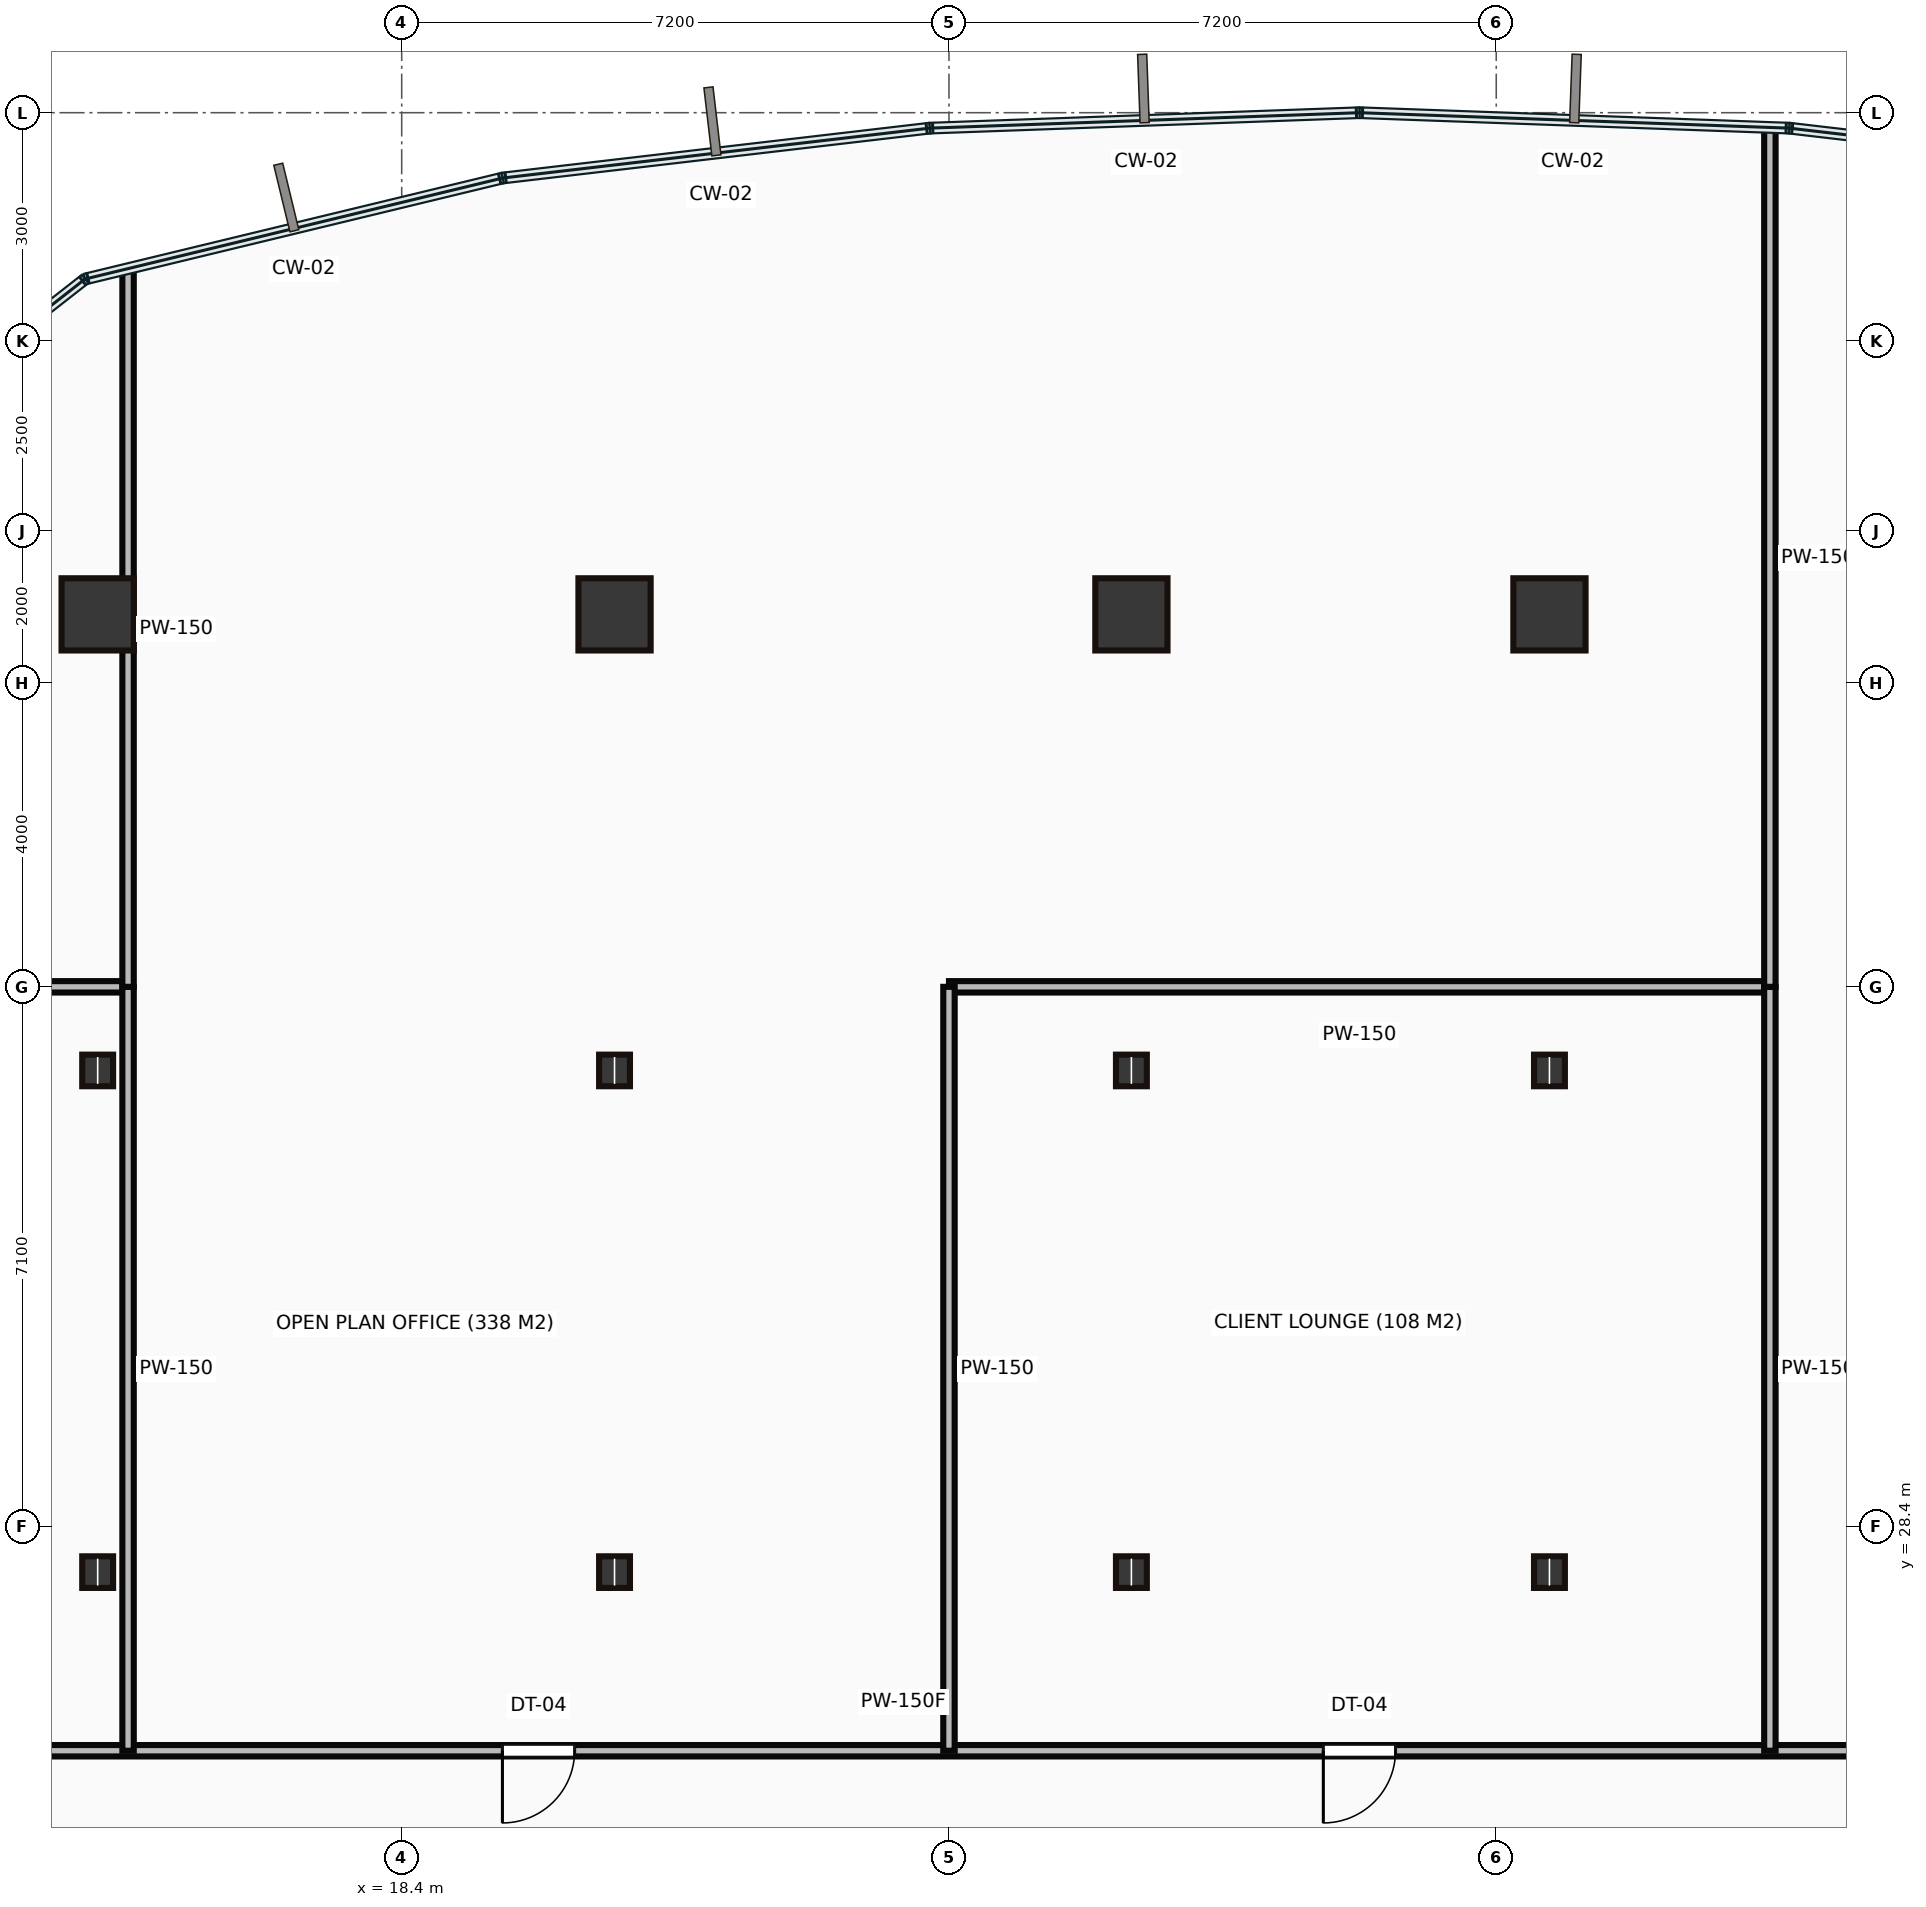
"""IFC4 building model, lengths in metres.
Left out: names, types, materials, properties, quantities, classifications, styles, units other than length and angle.
Written with IfcOpenShell. Run it as: python <this file> out.ifc"""

import sys

from ifc_helpers import new_model, si_unit, direction, frame, frame_2d, origin, origin_2d, place, context, subcontext, project, spatial, rectangle, hollow_rectangle, i_section, extrude, source, transform, mapped, element, fill, save


model = new_model("IFC4")
c1 = context("Model", 3, precision=1e-05, world=origin(), true_north=direction((0.0, 1.0)))
c2 = subcontext(c1, "Body", "Model", "MODEL_VIEW")
j1 = project(units=[si_unit("LENGTHUNIT", "METRE"), si_unit("PLANEANGLEUNIT", "RADIAN")], contexts=[c1])
p1 = place(None, origin())
s1 = spatial("IfcSite", under=j1, at=p1, CompositionType="ELEMENT")
p2 = place(p1, origin())
s2 = spatial("IfcBuilding", under=s1, at=p2, CompositionType="ELEMENT")
p3 = place(p2, frame((0.0, 0.0, 32.5)))
s3 = spatial("IfcBuildingStorey", under=s2, at=p3, CompositionType="ELEMENT", Elevation=32.5)
m1 = source(origin(), c2, "Body", "SweptSolid", [
    extrude(i_section(OverallWidth=0.406, OverallDepth=0.416, WebThickness=0.03, FlangeThickness=0.048, at=origin_2d()), origin(), (0.0, 0.0, 1.0), 3.65),
])
for number, where, z_axis, x_axis in (
    (1, (14.4, 27.8, 0.0), (0.0, 0.0, 1.0), (1.0, 0.0, 0.0)),
    (2, (14.4, 34.4, 0.0), (0.0, 0.0, 1.0), (1.0, 0.0, 0.0)),
):
    element("IfcColumn", number, at=place(p3, frame(where, z_axis=z_axis, x_axis=x_axis)), inside=s3, PredefinedType="COLUMN", context=c2, shape_type="MappedRepresentation", body=[
        mapped(m1, transform((0.0, 0.0, 0.0))),
    ])
m2 = source(origin(), c2, "Body", "SweptSolid", [
    extrude(hollow_rectangle(XDim=0.95, YDim=0.95, WallThickness=0.045, at=origin_2d()), origin(), (0.0, 0.0, 1.0), 3.65),
])
p4 = place(p3, frame((14.4, 40.4, 0.0), z_axis=(0.0, 0.0, 1.0), x_axis=(1.0, 0.0, 0.0)))
e3 = element("IfcColumn", 3, at=p4, inside=s3, PredefinedType="COLUMN", context=c2, shape_type="MappedRepresentation", body=[
    mapped(m2, transform((0.0, 0.0, 0.0))),
])
for number, where, z_axis, x_axis in (
    (4, (21.2, 27.8, 0.0), (0.0, 0.0, 1.0), (1.0, 0.0, 0.0)),
    (5, (21.2, 34.4, 0.0), (0.0, 0.0, 1.0), (1.0, 0.0, 0.0)),
):
    element("IfcColumn", number, at=place(p3, frame(where, z_axis=z_axis, x_axis=x_axis)), inside=s3, PredefinedType="COLUMN", context=c2, shape_type="MappedRepresentation", body=[
        mapped(m1, transform((0.0, 0.0, 0.0))),
    ])
p5 = place(p3, frame((21.2, 40.4, 0.0), z_axis=(0.0, 0.0, 1.0), x_axis=(1.0, 0.0, 0.0)))
e6 = element("IfcColumn", 6, at=p5, inside=s3, PredefinedType="COLUMN", context=c2, shape_type="MappedRepresentation", body=[
    mapped(m2, transform((0.0, 0.0, 0.0))),
])
for number, where, z_axis, x_axis in (
    (7, (28.0, 27.8, 0.0), (0.0, 0.0, 1.0), (1.0, 0.0, 0.0)),
    (8, (28.0, 34.4, 0.0), (0.0, 0.0, 1.0), (1.0, 0.0, 0.0)),
):
    element("IfcColumn", number, at=place(p3, frame(where, z_axis=z_axis, x_axis=x_axis)), inside=s3, PredefinedType="COLUMN", context=c2, shape_type="MappedRepresentation", body=[
        mapped(m1, transform((0.0, 0.0, 0.0))),
    ])
p6 = place(p3, frame((28.0, 40.4, 0.0), z_axis=(0.0, 0.0, 1.0), x_axis=(1.0, 0.0, 0.0)))
e9 = element("IfcColumn", 9, at=p6, inside=s3, PredefinedType="COLUMN", context=c2, shape_type="MappedRepresentation", body=[
    mapped(m2, transform((0.0, 0.0, 0.0))),
])
for number, where, z_axis, x_axis in (
    (10, (33.5, 27.8, 0.0), (0.0, 0.0, 1.0), (1.0, 0.0, 0.0)),
    (11, (33.5, 34.4, 0.0), (0.0, 0.0, 1.0), (1.0, 0.0, 0.0)),
):
    element("IfcColumn", number, at=place(p3, frame(where, z_axis=z_axis, x_axis=x_axis)), inside=s3, PredefinedType="COLUMN", context=c2, shape_type="MappedRepresentation", body=[
        mapped(m1, transform((0.0, 0.0, 0.0))),
    ])
p7 = place(p3, frame((33.5, 40.4, 0.0), z_axis=(0.0, 0.0, 1.0), x_axis=(1.0, 0.0, 0.0)))
e12 = element("IfcColumn", 12, at=p7, inside=s3, PredefinedType="COLUMN", context=c2, shape_type="MappedRepresentation", body=[
    mapped(m2, transform((0.0, 0.0, 0.0))),
])
m3 = source(origin(), c2, "Body", "SweptSolid", [
    extrude(rectangle(XDim=38.8, YDim=0.15, at=frame_2d((19.4, 0.0))), origin(), (0.0, 0.0, 1.0), 3.4),
])
p8 = place(p3, frame((5.6, 25.45, 0.0), z_axis=(0.0, 0.0, 1.0), x_axis=(1.0, 0.0, 0.0)))
e13 = element("IfcWall", 13, at=p8, inside=s3, PredefinedType="PARTITIONING", context=c2, shape_type="MappedRepresentation", body=[
    mapped(m3, transform((0.0, 0.0, 0.0))),
])
p9 = place(p8, frame((14.125, 0.0, 0.0)))
e14 = element("IfcOpeningElement", 14, at=p9, cuts=e13, PredefinedType="OPENING", context=c2, shape_type="SweptSolid", body=[
    extrude(rectangle(XDim=0.95, YDim=2.15, at=frame_2d((0.475, 1.075))), frame((0.0, 0.085, 0.0), z_axis=(0.0, -1.0, 0.0), x_axis=(1.0, 0.0, 0.0)), (0.0, 0.0, 1.0), 0.17),
])
p10 = place(p8, frame((24.925, 0.0, 0.0)))
e15 = element("IfcOpeningElement", 15, at=p10, cuts=e13, PredefinedType="OPENING", context=c2, shape_type="SweptSolid", body=[
    extrude(rectangle(XDim=0.95, YDim=2.15, at=frame_2d((0.475, 1.075))), frame((0.0, 0.085, 0.0), z_axis=(0.0, -1.0, 0.0), x_axis=(1.0, 0.0, 0.0)), (0.0, 0.0, 1.0), 0.17),
])
m4 = source(origin(), c2, "Body", "SweptSolid", [
    extrude(rectangle(XDim=9.2, YDim=0.15, at=frame_2d((4.6, 0.0))), origin(), (0.0, 0.0, 1.0), 3.4),
])
p11 = place(p3, frame((14.8, 35.5, 0.0), z_axis=(0.0, 0.0, 1.0), x_axis=(-1.0, 0.0, 0.0)))
e16 = element("IfcWall", 16, at=p11, inside=s3, PredefinedType="PARTITIONING", context=c2, shape_type="MappedRepresentation", body=[
    mapped(m4, transform((0.0, 0.0, 0.0))),
])
m5 = source(origin(), c2, "Body", "SweptSolid", [
    extrude(rectangle(XDim=10.05, YDim=0.15, at=frame_2d((5.025, 0.0))), origin(), (0.0, 0.0, 1.0), 3.4),
])
p12 = place(p3, frame((14.8, 35.5, 0.0), z_axis=(0.0, 0.0, 1.0), x_axis=(0.0, -1.0, 0.0)))
e17 = element("IfcWall", 17, at=p12, inside=s3, PredefinedType="PARTITIONING", context=c2, shape_type="MappedRepresentation", body=[
    mapped(m5, transform((0.0, 0.0, 0.0))),
])
m6 = source(origin(), c2, "Body", "SweptSolid", [
    extrude(rectangle(XDim=9.428, YDim=0.15, at=frame_2d((4.714, 0.0))), origin(), (0.0, 0.0, 1.0), 3.4),
])
p13 = place(p3, frame((14.8, 44.928, 0.0), z_axis=(0.0, 0.0, 1.0), x_axis=(0.0, -1.0, 0.0)))
e18 = element("IfcWall", 18, at=p13, inside=s3, PredefinedType="PARTITIONING", context=c2, shape_type="MappedRepresentation", body=[
    mapped(m6, transform((0.0, 0.0, 0.0))),
])
m7 = source(origin(), c2, "Body", "SweptSolid", [
    extrude(rectangle(XDim=10.8, YDim=0.15, at=frame_2d((5.4, 0.0))), origin(), (0.0, 0.0, 1.0), 3.4),
])
p14 = place(p3, frame((36.4, 35.5, 0.0), z_axis=(0.0, 0.0, 1.0), x_axis=(-1.0, 0.0, 0.0)))
e19 = element("IfcWall", 19, at=p14, inside=s3, PredefinedType="PARTITIONING", context=c2, shape_type="MappedRepresentation", body=[
    mapped(m7, transform((0.0, 0.0, 0.0))),
])
for number, where, z_axis, x_axis in (
    (20, (25.6, 35.5, 0.0), (0.0, 0.0, 1.0), (0.0, -1.0, 0.0)),
    (21, (36.4, 35.5, 0.0), (0.0, 0.0, 1.0), (0.0, -1.0, 0.0)),
):
    element("IfcWall", number, at=place(p3, frame(where, z_axis=z_axis, x_axis=x_axis)), inside=s3, PredefinedType="PARTITIONING", context=c2, shape_type="MappedRepresentation", body=[
        mapped(m5, transform((0.0, 0.0, 0.0))),
    ])
m8 = source(origin(), c2, "Body", "SweptSolid", [
    extrude(rectangle(XDim=11.286, YDim=0.15, at=frame_2d((5.643, 0.0))), origin(), (0.0, 0.0, 1.0), 3.4),
])
p15 = place(p3, frame((36.4, 46.786, 0.0), z_axis=(0.0, 0.0, 1.0), x_axis=(0.0, -1.0, 0.0)))
e22 = element("IfcWall", 22, at=p15, inside=s3, PredefinedType="PARTITIONING", context=c2, shape_type="MappedRepresentation", body=[
    mapped(m8, transform((0.0, 0.0, 0.0))),
])
m9 = source(origin(), c2, "Body", "SweptSolid", [
    extrude(rectangle(XDim=0.95, YDim=2.15, at=frame_2d((0.475, 1.075))), frame((0.0, 0.025, 0.0), z_axis=(0.0, -1.0, 0.0), x_axis=(1.0, 0.0, 0.0)), (0.0, 0.0, 1.0), 0.05),
])
p16 = place(p9, origin())
e23 = element("IfcDoor", 23, at=p16, inside=s3, OperationType="SINGLE_SWING_LEFT", PredefinedType="DOOR", context=c2, shape_type="MappedRepresentation", body=[
    mapped(m9, transform((0.0, 0.0, 0.0))),
])
fill(e14, e23)
p17 = place(p10, origin())
e24 = element("IfcDoor", 24, at=p17, inside=s3, OperationType="SINGLE_SWING_LEFT", PredefinedType="DOOR", context=c2, shape_type="MappedRepresentation", body=[
    mapped(m9, transform((0.0, 0.0, 0.0))),
])
fill(e15, e24)
save(model, sys.argv[1])
